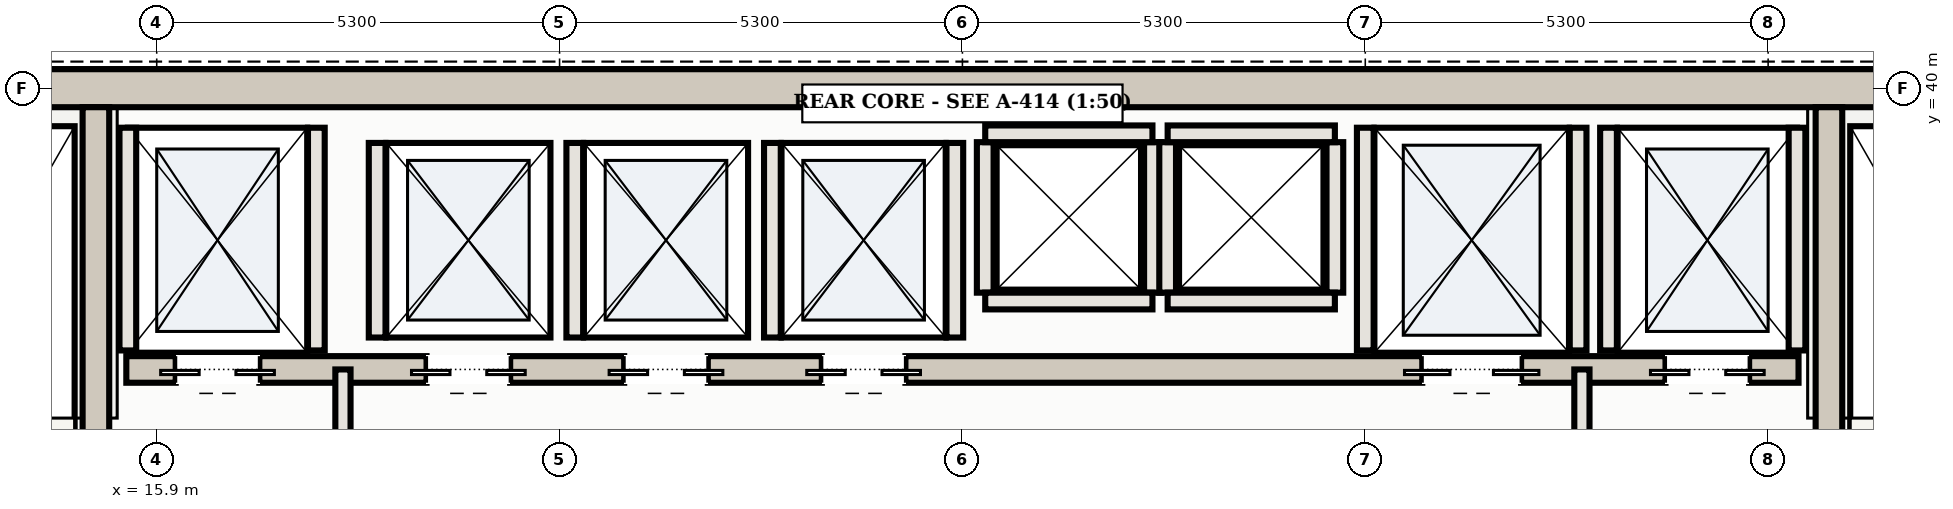
"""IFC4 building model, lengths in metres.
Left out: names, types, materials, properties, quantities, classifications, styles, units other than length and angle.
Written with IfcOpenShell. Run it as: python <this file> out.ifc"""

import sys

from ifc_helpers import new_model, si_unit, direction, frame, frame_2d, origin, place, context, subcontext, project, spatial, rectangle, extrude, element, fill, save


model = new_model("IFC4")
c1 = context("Model", 3, precision=1e-05, world=origin(), true_north=direction((0.0, 1.0)))
c2 = subcontext(c1, "Body", "Model", "MODEL_VIEW")
j1 = project(units=[si_unit("LENGTHUNIT", "METRE"), si_unit("PLANEANGLEUNIT", "RADIAN")], contexts=[c1])
p1 = place(None, origin())
s1 = spatial("IfcSite", under=j1, at=p1, CompositionType="ELEMENT")
p2 = place(p1, origin())
s2 = spatial("IfcBuilding", under=s1, at=p2, CompositionType="ELEMENT")
p3 = place(p2, frame((0.0, 0.0, 262.7)))
s3 = spatial("IfcBuildingStorey", under=s2, at=p3, CompositionType="ELEMENT", Elevation=262.7)
p4 = place(p3, frame((10.35, 40.0, 0.0), z_axis=(0.0, 0.0, 1.0), x_axis=(1.0, 0.0, 0.0)))
e1 = element("IfcWall", 1, at=p4, inside=s3, PredefinedType="SHEAR", context=c2, shape_type="SweptSolid", body=[
    extrude(rectangle(XDim=32.3, YDim=0.5, at=frame_2d((16.15, 0.0))), origin(), (0.0, 0.0, 1.0), 3.04),
])
p5 = place(p3, frame((15.1, 31.1, 0.0), z_axis=(0.0, 0.0, 1.0), x_axis=(0.0, 1.0, 0.0)))
e2 = element("IfcWall", 2, at=p5, inside=s3, PredefinedType="SHEAR", context=c2, shape_type="SweptSolid", body=[
    extrude(rectangle(XDim=8.65, YDim=0.35, at=frame_2d((4.325, 0.0))), origin(), (0.0, 0.0, 1.0), 3.04),
])
p6 = place(p5, frame((0.51, 0.0, 0.0)))
e3 = element("IfcOpeningElement", 3, at=p6, cuts=e2, PredefinedType="OPENING", context=c2, shape_type="SweptSolid", body=[
    extrude(rectangle(XDim=1.15, YDim=2.2, at=frame_2d((0.575, 1.1))), frame((0.0, 0.185, 0.0), z_axis=(0.0, -1.0, 0.0), x_axis=(1.0, 0.0, 0.0)), (0.0, 0.0, 1.0), 0.37),
])
p7 = place(p3, frame((37.9, 31.1, 0.0), z_axis=(0.0, 0.0, 1.0), x_axis=(0.0, 1.0, 0.0)))
e4 = element("IfcWall", 4, at=p7, inside=s3, PredefinedType="SHEAR", context=c2, shape_type="SweptSolid", body=[
    extrude(rectangle(XDim=8.65, YDim=0.35, at=frame_2d((4.325, 0.0))), origin(), (0.0, 0.0, 1.0), 3.04),
])
p8 = place(p7, frame((0.51, 0.0, 0.0)))
e5 = element("IfcOpeningElement", 5, at=p8, cuts=e4, PredefinedType="OPENING", context=c2, shape_type="SweptSolid", body=[
    extrude(rectangle(XDim=1.15, YDim=2.2, at=frame_2d((0.575, 1.1))), frame((0.0, 0.185, 0.0), z_axis=(0.0, -1.0, 0.0), x_axis=(1.0, 0.0, 0.0)), (0.0, 0.0, 1.0), 0.37),
])
p9 = place(p3, frame((15.5, 36.3, 0.0), z_axis=(0.0, 0.0, 1.0), x_axis=(1.0, 0.0, 0.0)))
e6 = element("IfcWall", 6, at=p9, inside=s3, PredefinedType="SHEAR", context=c2, shape_type="SweptSolid", body=[
    extrude(rectangle(XDim=22.0, YDim=0.35, at=frame_2d((11.0, 0.0))), origin(), (0.0, 0.0, 1.0), 3.04),
])
p10 = place(p9, frame((0.65, 0.0, 0.0)))
e7 = element("IfcOpeningElement", 7, at=p10, cuts=e6, PredefinedType="OPENING", context=c2, shape_type="SweptSolid", body=[
    extrude(rectangle(XDim=1.1, YDim=2.15, at=frame_2d((0.55, 1.075))), frame((0.0, 0.185, 0.0), z_axis=(0.0, -1.0, 0.0), x_axis=(1.0, 0.0, 0.0)), (0.0, 0.0, 1.0), 0.37),
])
p11 = place(p9, frame((20.25, 0.0, 0.0)))
e8 = element("IfcOpeningElement", 8, at=p11, cuts=e6, PredefinedType="OPENING", context=c2, shape_type="SweptSolid", body=[
    extrude(rectangle(XDim=1.1, YDim=2.15, at=frame_2d((0.55, 1.075))), frame((0.0, 0.185, 0.0), z_axis=(0.0, -1.0, 0.0), x_axis=(1.0, 0.0, 0.0)), (0.0, 0.0, 1.0), 0.37),
])
p12 = place(p9, frame((17.05, 0.0, 0.0)))
e9 = element("IfcOpeningElement", 9, at=p12, cuts=e6, PredefinedType="OPENING", context=c2, shape_type="SweptSolid", body=[
    extrude(rectangle(XDim=1.3, YDim=2.2, at=frame_2d((0.65, 1.1))), frame((0.0, 0.185, 0.0), z_axis=(0.0, -1.0, 0.0), x_axis=(1.0, 0.0, 0.0)), (0.0, 0.0, 1.0), 0.37),
])
p13 = place(p9, frame((3.95, 0.0, 0.0)))
e10 = element("IfcOpeningElement", 10, at=p13, cuts=e6, PredefinedType="OPENING", context=c2, shape_type="SweptSolid", body=[
    extrude(rectangle(XDim=1.1, YDim=2.15, at=frame_2d((0.55, 1.075))), frame((0.0, 0.185, 0.0), z_axis=(0.0, -1.0, 0.0), x_axis=(1.0, 0.0, 0.0)), (0.0, 0.0, 1.0), 0.37),
])
p14 = place(p9, frame((6.55, 0.0, 0.0)))
e11 = element("IfcOpeningElement", 11, at=p14, cuts=e6, PredefinedType="OPENING", context=c2, shape_type="SweptSolid", body=[
    extrude(rectangle(XDim=1.1, YDim=2.15, at=frame_2d((0.55, 1.075))), frame((0.0, 0.185, 0.0), z_axis=(0.0, -1.0, 0.0), x_axis=(1.0, 0.0, 0.0)), (0.0, 0.0, 1.0), 0.37),
])
p15 = place(p9, frame((9.15, 0.0, 0.0)))
e12 = element("IfcOpeningElement", 12, at=p15, cuts=e6, PredefinedType="OPENING", context=c2, shape_type="SweptSolid", body=[
    extrude(rectangle(XDim=1.1, YDim=2.15, at=frame_2d((0.55, 1.075))), frame((0.0, 0.185, 0.0), z_axis=(0.0, -1.0, 0.0), x_axis=(1.0, 0.0, 0.0)), (0.0, 0.0, 1.0), 0.37),
])
for number, where, z_axis, x_axis in (
    (13, (15.52, 36.55, 0.0), (0.0, 0.0, 1.0), (0.0, 1.0, 0.0)),
    (14, (18.0, 36.55, 0.0), (0.0, 0.0, 1.0), (0.0, 1.0, 0.0)),
    (15, (35.0, 36.55, 0.0), (0.0, 0.0, 1.0), (0.0, 1.0, 0.0)),
    (16, (37.48, 36.55, 0.0), (0.0, 0.0, 1.0), (0.0, 1.0, 0.0)),
    (17, (31.8, 36.55, 0.0), (0.0, 0.0, 1.0), (0.0, 1.0, 0.0)),
    (18, (34.6, 36.55, 0.0), (0.0, 0.0, 1.0), (0.0, 1.0, 0.0)),
):
    element("IfcWall", number, at=place(p3, frame(where, z_axis=z_axis, x_axis=x_axis)), inside=s3, PredefinedType="SOLIDWALL", context=c2, shape_type="SweptSolid", body=[
        extrude(rectangle(XDim=2.93, YDim=0.22, at=frame_2d((1.465, 0.0))), origin(), (0.0, 0.0, 1.0), 3.04),
    ])
for number, where, z_axis, x_axis in (
    (19, (18.8, 36.72, 0.0), (0.0, 0.0, 1.0), (0.0, 1.0, 0.0)),
    (20, (21.4, 36.72, 0.0), (0.0, 0.0, 1.0), (0.0, 1.0, 0.0)),
    (21, (24.0, 36.72, 0.0), (0.0, 0.0, 1.0), (0.0, 1.0, 0.0)),
    (22, (26.4, 36.72, 0.0), (0.0, 0.0, 1.0), (0.0, 1.0, 0.0)),
):
    element("IfcWall", number, at=place(p3, frame(where, z_axis=z_axis, x_axis=x_axis)), inside=s3, PredefinedType="SOLIDWALL", context=c2, shape_type="SweptSolid", body=[
        extrude(rectangle(XDim=2.56, YDim=0.22, at=frame_2d((1.28, 0.0))), origin(), (0.0, 0.0, 1.0), 3.04),
    ])
for number, where, z_axis, x_axis in (
    (23, (26.8, 37.31, 0.0), (0.0, 0.0, 1.0), (0.0, 1.0, 0.0)),
    (24, (29.0, 37.31, 0.0), (0.0, 0.0, 1.0), (0.0, 1.0, 0.0)),
):
    element("IfcWall", number, at=place(p3, frame(where, z_axis=z_axis, x_axis=x_axis)), inside=s3, PredefinedType="SOLIDWALL", context=c2, shape_type="SweptSolid", body=[
        extrude(rectangle(XDim=1.98, YDim=0.22, at=frame_2d((0.99, 0.0))), origin(), (0.0, 0.0, 1.0), 3.04),
    ])
for number, where, z_axis, x_axis in (
    (25, (26.8, 39.4, 0.0), (0.0, 0.0, 1.0), (1.0, 0.0, 0.0)),
    (26, (26.8, 37.2, 0.0), (0.0, 0.0, 1.0), (1.0, 0.0, 0.0)),
):
    element("IfcWall", number, at=place(p3, frame(where, z_axis=z_axis, x_axis=x_axis)), inside=s3, PredefinedType="SOLIDWALL", context=c2, shape_type="SweptSolid", body=[
        extrude(rectangle(XDim=2.2, YDim=0.22, at=frame_2d((1.1, 0.0))), origin(), (0.0, 0.0, 1.0), 3.04),
    ])
for number, where, z_axis, x_axis in (
    (27, (29.2, 37.31, 0.0), (0.0, 0.0, 1.0), (0.0, 1.0, 0.0)),
    (28, (31.4, 37.31, 0.0), (0.0, 0.0, 1.0), (0.0, 1.0, 0.0)),
):
    element("IfcWall", number, at=place(p3, frame(where, z_axis=z_axis, x_axis=x_axis)), inside=s3, PredefinedType="SOLIDWALL", context=c2, shape_type="SweptSolid", body=[
        extrude(rectangle(XDim=1.98, YDim=0.22, at=frame_2d((0.99, 0.0))), origin(), (0.0, 0.0, 1.0), 3.04),
    ])
for number, where, z_axis, x_axis in (
    (29, (29.2, 39.4, 0.0), (0.0, 0.0, 1.0), (1.0, 0.0, 0.0)),
    (30, (29.2, 37.2, 0.0), (0.0, 0.0, 1.0), (1.0, 0.0, 0.0)),
):
    element("IfcWall", number, at=place(p3, frame(where, z_axis=z_axis, x_axis=x_axis)), inside=s3, PredefinedType="SOLIDWALL", context=c2, shape_type="SweptSolid", body=[
        extrude(rectangle(XDim=2.2, YDim=0.22, at=frame_2d((1.1, 0.0))), origin(), (0.0, 0.0, 1.0), 3.04),
    ])
p16 = place(p3, frame((18.35, 31.15, 0.0), z_axis=(0.0, 0.0, 1.0), x_axis=(0.0, 1.0, 0.0)))
e31 = element("IfcWall", 31, at=p16, inside=s3, PredefinedType="PARTITIONING", context=c2, shape_type="SweptSolid", body=[
    extrude(rectangle(XDim=5.15, YDim=0.2, at=frame_2d((2.575, 0.0))), origin(), (0.0, 0.0, 1.0), 2.38),
])
p17 = place(p16, frame((1.875, 0.0, 0.0)))
e32 = element("IfcOpeningElement", 32, at=p17, cuts=e31, PredefinedType="OPENING", context=c2, shape_type="SweptSolid", body=[
    extrude(rectangle(XDim=1.25, YDim=2.2, at=frame_2d((0.625, 1.1))), frame((0.0, 0.11, 0.0), z_axis=(0.0, -1.0, 0.0), x_axis=(1.0, 0.0, 0.0)), (0.0, 0.0, 1.0), 0.22),
])
p18 = place(p3, frame((34.65, 31.15, 0.0), z_axis=(0.0, 0.0, 1.0), x_axis=(0.0, 1.0, 0.0)))
e33 = element("IfcWall", 33, at=p18, inside=s3, PredefinedType="PARTITIONING", context=c2, shape_type="SweptSolid", body=[
    extrude(rectangle(XDim=5.15, YDim=0.2, at=frame_2d((2.575, 0.0))), origin(), (0.0, 0.0, 1.0), 2.38),
])
p19 = place(p18, frame((1.875, 0.0, 0.0)))
e34 = element("IfcOpeningElement", 34, at=p19, cuts=e33, PredefinedType="OPENING", context=c2, shape_type="SweptSolid", body=[
    extrude(rectangle(XDim=1.25, YDim=2.2, at=frame_2d((0.625, 1.1))), frame((0.0, 0.11, 0.0), z_axis=(0.0, -1.0, 0.0), x_axis=(1.0, 0.0, 0.0)), (0.0, 0.0, 1.0), 0.22),
])
p20 = place(p10, frame((1.1, 0.0, 0.0), z_axis=(0.0, 0.0, 1.0), x_axis=(-1.0, 0.0, 0.0)))
e35 = element("IfcDoor", 35, at=p20, inside=s3, OperationType="DOUBLE_DOOR_SLIDING", PredefinedType="DOOR", context=c2, shape_type="SweptSolid", body=[
    extrude(rectangle(XDim=1.1, YDim=2.15, at=frame_2d((0.55, 1.075))), frame((0.0, 0.025, 0.0), z_axis=(0.0, -1.0, 0.0), x_axis=(1.0, 0.0, 0.0)), (0.0, 0.0, 1.0), 0.05),
])
fill(e7, e35)
p21 = place(p11, frame((1.1, 0.0, 0.0), z_axis=(0.0, 0.0, 1.0), x_axis=(-1.0, 0.0, 0.0)))
e36 = element("IfcDoor", 36, at=p21, inside=s3, OperationType="DOUBLE_DOOR_SLIDING", PredefinedType="DOOR", context=c2, shape_type="SweptSolid", body=[
    extrude(rectangle(XDim=1.1, YDim=2.15, at=frame_2d((0.55, 1.075))), frame((0.0, 0.025, 0.0), z_axis=(0.0, -1.0, 0.0), x_axis=(1.0, 0.0, 0.0)), (0.0, 0.0, 1.0), 0.05),
])
fill(e8, e36)
p22 = place(p12, frame((1.3, 0.0, 0.0), z_axis=(0.0, 0.0, 1.0), x_axis=(-1.0, 0.0, 0.0)))
e37 = element("IfcDoor", 37, at=p22, inside=s3, OperationType="DOUBLE_DOOR_SLIDING", PredefinedType="DOOR", context=c2, shape_type="SweptSolid", body=[
    extrude(rectangle(XDim=1.3, YDim=2.2, at=frame_2d((0.65, 1.1))), frame((0.0, 0.025, 0.0), z_axis=(0.0, -1.0, 0.0), x_axis=(1.0, 0.0, 0.0)), (0.0, 0.0, 1.0), 0.05),
])
fill(e9, e37)
p23 = place(p13, frame((1.1, 0.0, 0.0), z_axis=(0.0, 0.0, 1.0), x_axis=(-1.0, 0.0, 0.0)))
e38 = element("IfcDoor", 38, at=p23, inside=s3, OperationType="DOUBLE_DOOR_SLIDING", PredefinedType="DOOR", context=c2, shape_type="SweptSolid", body=[
    extrude(rectangle(XDim=1.1, YDim=2.15, at=frame_2d((0.55, 1.075))), frame((0.0, 0.025, 0.0), z_axis=(0.0, -1.0, 0.0), x_axis=(1.0, 0.0, 0.0)), (0.0, 0.0, 1.0), 0.05),
])
fill(e10, e38)
p24 = place(p14, frame((1.1, 0.0, 0.0), z_axis=(0.0, 0.0, 1.0), x_axis=(-1.0, 0.0, 0.0)))
e39 = element("IfcDoor", 39, at=p24, inside=s3, OperationType="DOUBLE_DOOR_SLIDING", PredefinedType="DOOR", context=c2, shape_type="SweptSolid", body=[
    extrude(rectangle(XDim=1.1, YDim=2.15, at=frame_2d((0.55, 1.075))), frame((0.0, 0.025, 0.0), z_axis=(0.0, -1.0, 0.0), x_axis=(1.0, 0.0, 0.0)), (0.0, 0.0, 1.0), 0.05),
])
fill(e11, e39)
p25 = place(p15, frame((1.1, 0.0, 0.0), z_axis=(0.0, 0.0, 1.0), x_axis=(-1.0, 0.0, 0.0)))
e40 = element("IfcDoor", 40, at=p25, inside=s3, OperationType="DOUBLE_DOOR_SLIDING", PredefinedType="DOOR", context=c2, shape_type="SweptSolid", body=[
    extrude(rectangle(XDim=1.1, YDim=2.15, at=frame_2d((0.55, 1.075))), frame((0.0, 0.025, 0.0), z_axis=(0.0, -1.0, 0.0), x_axis=(1.0, 0.0, 0.0)), (0.0, 0.0, 1.0), 0.05),
])
fill(e12, e40)
save(model, sys.argv[1])
